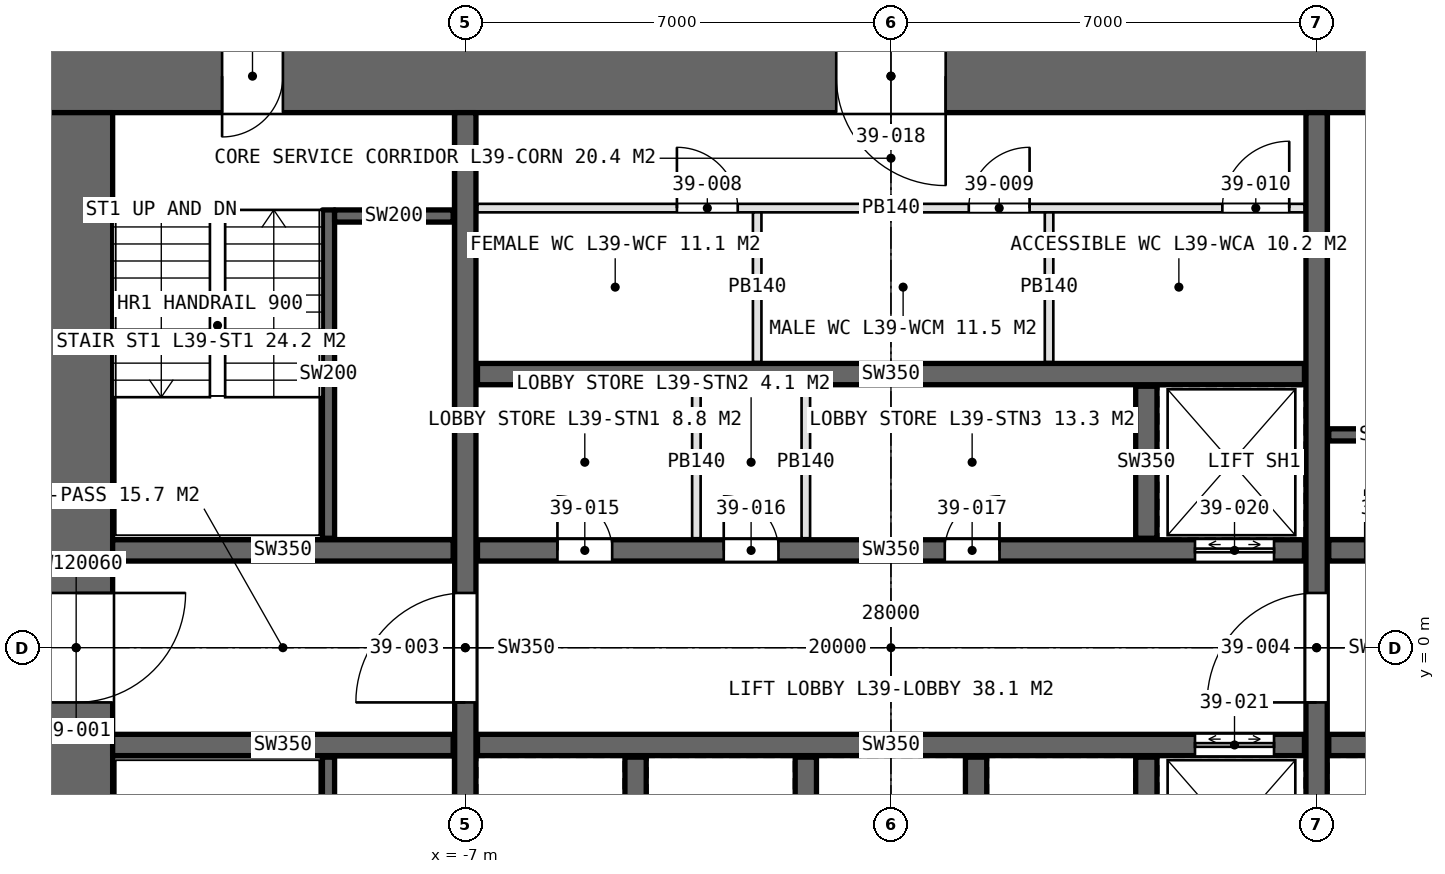
"""IFC4 building model, lengths in metres.
Left out: names, types, materials, properties, quantities, classifications, styles, units other than length and angle.
Written with IfcOpenShell. Run it as: python <this file> out.ifc"""

import sys

from ifc_helpers import new_model, si_unit, direction, frame, frame_2d, origin, place, context, subcontext, project, spatial, rectangle, extrude, element, fill, save


model = new_model("IFC4")
c1 = context("Model", 3, precision=1e-05, world=origin(), true_north=direction((0.0, 1.0)))
c2 = subcontext(c1, "Body", "Model", "MODEL_VIEW")
j1 = project(units=[si_unit("LENGTHUNIT", "METRE"), si_unit("PLANEANGLEUNIT", "RADIAN")], contexts=[c1])
p1 = place(None, origin())
s1 = spatial("IfcSite", under=j1, at=p1, CompositionType="ELEMENT")
p2 = place(p1, origin())
s2 = spatial("IfcBuilding", under=s1, at=p2, CompositionType="ELEMENT")
p3 = place(p2, frame((0.0, 0.0, 180.6)))
s3 = spatial("IfcBuildingStorey", under=s2, at=p3, CompositionType="ELEMENT", Elevation=180.6)
p4 = place(p3, frame((14.0, 9.4, 0.0), z_axis=(0.0, 0.0, 1.0), x_axis=(-1.0, 0.0, 0.0)))
e1 = element("IfcWall", 1, at=p4, inside=s3, PredefinedType="SHEAR", context=c2, shape_type="SweptSolid", body=[
    extrude(rectangle(XDim=28.0, YDim=1.2, at=frame_2d((14.0, 0.0))), origin(), (0.0, 0.0, 1.0), 4.2),
])
p5 = place(p4, frame((24.0, 0.0, 0.0)))
e2 = element("IfcOpeningElement", 2, at=p5, cuts=e1, PredefinedType="OPENING", context=c2, shape_type="SweptSolid", body=[
    extrude(rectangle(XDim=1.0, YDim=2.4, at=frame_2d((0.5, 1.2))), frame((0.0, 0.61, 0.0), z_axis=(0.0, -1.0, 0.0), x_axis=(1.0, 0.0, 0.0)), (0.0, 0.0, 1.0), 1.22),
])
p6 = place(p4, frame((13.1, 0.0, 0.0)))
e3 = element("IfcOpeningElement", 3, at=p6, cuts=e1, PredefinedType="OPENING", context=c2, shape_type="SweptSolid", body=[
    extrude(rectangle(XDim=1.8, YDim=2.4, at=frame_2d((0.9, 1.2))), frame((0.0, 0.61, 0.0), z_axis=(0.0, -1.0, 0.0), x_axis=(1.0, 0.0, 0.0)), (0.0, 0.0, 1.0), 1.22),
])
p7 = place(p3, frame((-13.4, 8.8, 0.0), z_axis=(0.0, 0.0, 1.0), x_axis=(0.0, -1.0, 0.0)))
e4 = element("IfcWall", 4, at=p7, inside=s3, PredefinedType="SHEAR", context=c2, shape_type="SweptSolid", body=[
    extrude(rectangle(XDim=17.6, YDim=1.2, at=frame_2d((8.8, 0.0))), origin(), (0.0, 0.0, 1.0), 4.2),
])
p8 = place(p7, frame((7.9, 0.0, 0.0)))
e5 = element("IfcOpeningElement", 5, at=p8, cuts=e4, PredefinedType="OPENING", context=c2, shape_type="SweptSolid", body=[
    extrude(rectangle(XDim=1.8, YDim=2.4, at=frame_2d((0.9, 1.2))), frame((0.0, 0.61, 0.0), z_axis=(0.0, -1.0, 0.0), x_axis=(1.0, 0.0, 0.0)), (0.0, 0.0, 1.0), 1.22),
])
p9 = place(p7, frame((16.5, 0.0, 0.0)))
e6 = element("IfcOpeningElement", 6, at=p9, cuts=e4, PredefinedType="OPENING", context=c2, shape_type="SweptSolid", body=[
    extrude(rectangle(XDim=1.0, YDim=2.4, at=frame_2d((0.5, 1.2))), frame((0.0, 0.61, 0.0), z_axis=(0.0, -1.0, 0.0), x_axis=(1.0, 0.0, 0.0)), (0.0, 0.0, 1.0), 1.22),
])
p10 = place(p3, frame((-7.0, -8.8, 0.0), z_axis=(0.0, 0.0, 1.0), x_axis=(0.0, 1.0, 0.0)))
e7 = element("IfcWall", 7, at=p10, inside=s3, PredefinedType="SHEAR", context=c2, shape_type="SweptSolid", body=[
    extrude(rectangle(XDim=17.6, YDim=0.35, at=frame_2d((8.8, 0.0))), origin(), (0.0, 0.0, 1.0), 4.2),
])
p11 = place(p10, frame((7.9, 0.0, 0.0)))
e8 = element("IfcOpeningElement", 8, at=p11, cuts=e7, PredefinedType="OPENING", context=c2, shape_type="SweptSolid", body=[
    extrude(rectangle(XDim=1.8, YDim=2.4, at=frame_2d((0.9, 1.2))), frame((0.0, 0.185, 0.0), z_axis=(0.0, -1.0, 0.0), x_axis=(1.0, 0.0, 0.0)), (0.0, 0.0, 1.0), 0.37),
])
p12 = place(p3, frame((7.0, -8.8, 0.0), z_axis=(0.0, 0.0, 1.0), x_axis=(0.0, 1.0, 0.0)))
e9 = element("IfcWall", 9, at=p12, inside=s3, PredefinedType="SHEAR", context=c2, shape_type="SweptSolid", body=[
    extrude(rectangle(XDim=17.6, YDim=0.35, at=frame_2d((8.8, 0.0))), origin(), (0.0, 0.0, 1.0), 4.2),
])
p13 = place(p12, frame((7.9, 0.0, 0.0)))
e10 = element("IfcOpeningElement", 10, at=p13, cuts=e9, PredefinedType="OPENING", context=c2, shape_type="SweptSolid", body=[
    extrude(rectangle(XDim=1.8, YDim=2.4, at=frame_2d((0.9, 1.2))), frame((0.0, 0.185, 0.0), z_axis=(0.0, -1.0, 0.0), x_axis=(1.0, 0.0, 0.0)), (0.0, 0.0, 1.0), 0.37),
])
p14 = place(p3, frame((-6.8, 1.6, 0.0), z_axis=(0.0, 0.0, 1.0), x_axis=(1.0, 0.0, 0.0)))
e11 = element("IfcWall", 11, at=p14, inside=s3, PredefinedType="SHEAR", context=c2, shape_type="SweptSolid", body=[
    extrude(rectangle(XDim=13.6, YDim=0.35, at=frame_2d((6.8, 0.0))), origin(), (0.0, 0.0, 1.0), 4.2),
])
p15 = place(p14, frame((1.315, 0.0, 0.0)))
e12 = element("IfcOpeningElement", 12, at=p15, cuts=e11, PredefinedType="OPENING", context=c2, shape_type="SweptSolid", body=[
    extrude(rectangle(XDim=0.9, YDim=2.4, at=frame_2d((0.45, 1.2))), frame((0.0, 0.185, 0.0), z_axis=(0.0, -1.0, 0.0), x_axis=(1.0, 0.0, 0.0)), (0.0, 0.0, 1.0), 0.37),
])
p16 = place(p14, frame((4.05, 0.0, 0.0)))
e13 = element("IfcOpeningElement", 13, at=p16, cuts=e11, PredefinedType="OPENING", context=c2, shape_type="SweptSolid", body=[
    extrude(rectangle(XDim=0.9, YDim=2.4, at=frame_2d((0.45, 1.2))), frame((0.0, 0.185, 0.0), z_axis=(0.0, -1.0, 0.0), x_axis=(1.0, 0.0, 0.0)), (0.0, 0.0, 1.0), 0.37),
])
p17 = place(p14, frame((7.685, 0.0, 0.0)))
e14 = element("IfcOpeningElement", 14, at=p17, cuts=e11, PredefinedType="OPENING", context=c2, shape_type="SweptSolid", body=[
    extrude(rectangle(XDim=0.9, YDim=2.4, at=frame_2d((0.45, 1.2))), frame((0.0, 0.185, 0.0), z_axis=(0.0, -1.0, 0.0), x_axis=(1.0, 0.0, 0.0)), (0.0, 0.0, 1.0), 0.37),
])
p18 = place(p14, frame((11.8, 0.0, 0.0)))
e15 = element("IfcOpeningElement", 15, at=p18, cuts=e11, PredefinedType="OPENING", context=c2, shape_type="SweptSolid", body=[
    extrude(rectangle(XDim=1.3, YDim=2.4, at=frame_2d((0.65, 1.2))), frame((0.0, 0.185, 0.0), z_axis=(0.0, -1.0, 0.0), x_axis=(1.0, 0.0, 0.0)), (0.0, 0.0, 1.0), 0.37),
])
p19 = place(p3, frame((-6.8, -1.6, 0.0), z_axis=(0.0, 0.0, 1.0), x_axis=(1.0, 0.0, 0.0)))
e16 = element("IfcWall", 16, at=p19, inside=s3, PredefinedType="SHEAR", context=c2, shape_type="SweptSolid", body=[
    extrude(rectangle(XDim=13.6, YDim=0.35, at=frame_2d((6.8, 0.0))), origin(), (0.0, 0.0, 1.0), 4.2),
])
p20 = place(p19, frame((11.8, 0.0, 0.0)))
e17 = element("IfcOpeningElement", 17, at=p20, cuts=e16, PredefinedType="OPENING", context=c2, shape_type="SweptSolid", body=[
    extrude(rectangle(XDim=1.3, YDim=2.4, at=frame_2d((0.65, 1.2))), frame((0.0, 0.185, 0.0), z_axis=(0.0, -1.0, 0.0), x_axis=(1.0, 0.0, 0.0)), (0.0, 0.0, 1.0), 0.37),
])
p21 = place(p3, frame((-6.8, 4.5, 0.0), z_axis=(0.0, 0.0, 1.0), x_axis=(1.0, 0.0, 0.0)))
e18 = element("IfcWall", 18, at=p21, inside=s3, PredefinedType="SHEAR", context=c2, shape_type="SweptSolid", body=[
    extrude(rectangle(XDim=13.6, YDim=0.35, at=frame_2d((6.8, 0.0))), origin(), (0.0, 0.0, 1.0), 4.2),
])
for number, where, z_axis, x_axis in (
    (19, (-12.8, 1.6, 0.0), (0.0, 0.0, 1.0), (1.0, 0.0, 0.0)),
    (20, (-12.8, -1.6, 0.0), (0.0, 0.0, 1.0), (1.0, 0.0, 0.0)),
):
    element("IfcWall", number, at=place(p3, frame(where, z_axis=z_axis, x_axis=x_axis)), inside=s3, PredefinedType="SHEAR", context=c2, shape_type="SweptSolid", body=[
        extrude(rectangle(XDim=5.6, YDim=0.35, at=frame_2d((2.8, 0.0))), origin(), (0.0, 0.0, 1.0), 4.2),
    ])
p22 = place(p3, frame((7.2, 1.6, 0.0), z_axis=(0.0, 0.0, 1.0), x_axis=(1.0, 0.0, 0.0)))
e21 = element("IfcWall", 21, at=p22, inside=s3, PredefinedType="SHEAR", context=c2, shape_type="SweptSolid", body=[
    extrude(rectangle(XDim=5.6, YDim=0.35, at=frame_2d((2.8, 0.0))), origin(), (0.0, 0.0, 1.0), 4.2),
])
p23 = place(p22, frame((0.6, 0.0, 0.0)))
e22 = element("IfcOpeningElement", 22, at=p23, cuts=e21, PredefinedType="OPENING", context=c2, shape_type="SweptSolid", body=[
    extrude(rectangle(XDim=1.0, YDim=2.4, at=frame_2d((0.5, 1.2))), frame((0.0, 0.185, 0.0), z_axis=(0.0, -1.0, 0.0), x_axis=(1.0, 0.0, 0.0)), (0.0, 0.0, 1.0), 0.37),
])
p24 = place(p3, frame((7.2, -1.6, 0.0), z_axis=(0.0, 0.0, 1.0), x_axis=(1.0, 0.0, 0.0)))
e23 = element("IfcWall", 23, at=p24, inside=s3, PredefinedType="SHEAR", context=c2, shape_type="SweptSolid", body=[
    extrude(rectangle(XDim=5.6, YDim=0.35, at=frame_2d((2.8, 0.0))), origin(), (0.0, 0.0, 1.0), 4.2),
])
p25 = place(p24, frame((0.9, 0.0, 0.0)))
e24 = element("IfcOpeningElement", 24, at=p25, cuts=e23, PredefinedType="OPENING", context=c2, shape_type="SweptSolid", body=[
    extrude(rectangle(XDim=1.3, YDim=2.4, at=frame_2d((0.65, 1.2))), frame((0.0, 0.185, 0.0), z_axis=(0.0, -1.0, 0.0), x_axis=(1.0, 0.0, 0.0)), (0.0, 0.0, 1.0), 0.37),
])
p26 = place(p24, frame((3.9, 0.0, 0.0)))
e25 = element("IfcOpeningElement", 25, at=p26, cuts=e23, PredefinedType="OPENING", context=c2, shape_type="SweptSolid", body=[
    extrude(rectangle(XDim=1.3, YDim=2.4, at=frame_2d((0.65, 1.2))), frame((0.0, 0.185, 0.0), z_axis=(0.0, -1.0, 0.0), x_axis=(1.0, 0.0, 0.0)), (0.0, 0.0, 1.0), 0.37),
])
for number, where, z_axis, x_axis in (
    (26, (-4.2, -4.3, 0.0), (0.0, 0.0, 1.0), (0.0, 1.0, 0.0)),
    (27, (-1.4, -4.3, 0.0), (0.0, 0.0, 1.0), (0.0, 1.0, 0.0)),
    (28, (1.4, -4.3, 0.0), (0.0, 0.0, 1.0), (0.0, 1.0, 0.0)),
    (29, (4.2, 1.8, 0.0), (0.0, 0.0, 1.0), (0.0, 1.0, 0.0)),
    (30, (4.2, -4.3, 0.0), (0.0, 0.0, 1.0), (0.0, 1.0, 0.0)),
):
    element("IfcWall", number, at=place(p3, frame(where, z_axis=z_axis, x_axis=x_axis)), inside=s3, PredefinedType="SHEAR", context=c2, shape_type="SweptSolid", body=[
        extrude(rectangle(XDim=2.5, YDim=0.35, at=frame_2d((1.25, 0.0))), origin(), (0.0, 0.0, 1.0), 4.2),
    ])
p27 = place(p3, frame((-6.8, 7.23, 0.0), z_axis=(0.0, 0.0, 1.0), x_axis=(1.0, 0.0, 0.0)))
e31 = element("IfcWall", 31, at=p27, inside=s3, PredefinedType="PARTITIONING", context=c2, shape_type="SweptSolid", body=[
    extrude(rectangle(XDim=13.6, YDim=0.14, at=frame_2d((6.8, 0.0))), origin(), (0.0, 0.0, 1.0), 3.95),
])
p28 = place(p27, frame((3.28, 0.0, 0.0)))
e32 = element("IfcOpeningElement", 32, at=p28, cuts=e31, PredefinedType="OPENING", context=c2, shape_type="SweptSolid", body=[
    extrude(rectangle(XDim=1.0, YDim=2.4, at=frame_2d((0.5, 1.2))), frame((0.0, 0.08, 0.0), z_axis=(0.0, -1.0, 0.0), x_axis=(1.0, 0.0, 0.0)), (0.0, 0.0, 1.0), 0.16),
])
p29 = place(p27, frame((8.08, 0.0, 0.0)))
e33 = element("IfcOpeningElement", 33, at=p29, cuts=e31, PredefinedType="OPENING", context=c2, shape_type="SweptSolid", body=[
    extrude(rectangle(XDim=1.0, YDim=2.4, at=frame_2d((0.5, 1.2))), frame((0.0, 0.08, 0.0), z_axis=(0.0, -1.0, 0.0), x_axis=(1.0, 0.0, 0.0)), (0.0, 0.0, 1.0), 0.16),
])
p30 = place(p27, frame((12.25, 0.0, 0.0)))
e34 = element("IfcOpeningElement", 34, at=p30, cuts=e31, PredefinedType="OPENING", context=c2, shape_type="SweptSolid", body=[
    extrude(rectangle(XDim=1.1, YDim=2.4, at=frame_2d((0.55, 1.2))), frame((0.0, 0.08, 0.0), z_axis=(0.0, -1.0, 0.0), x_axis=(1.0, 0.0, 0.0)), (0.0, 0.0, 1.0), 0.16),
])
for number, where, z_axis, x_axis in (
    (35, (-2.2, 4.7, 0.0), (0.0, 0.0, 1.0), (0.0, 1.0, 0.0)),
    (36, (2.6, 4.7, 0.0), (0.0, 0.0, 1.0), (0.0, 1.0, 0.0)),
):
    element("IfcWall", number, at=place(p3, frame(where, z_axis=z_axis, x_axis=x_axis)), inside=s3, PredefinedType="PARTITIONING", context=c2, shape_type="SweptSolid", body=[
        extrude(rectangle(XDim=2.46, YDim=0.14, at=frame_2d((1.23, 0.0))), origin(), (0.0, 0.0, 1.0), 3.95),
    ])
for number, where, z_axis, x_axis in (
    (37, (-3.2, 1.8, 0.0), (0.0, 0.0, 1.0), (0.0, 1.0, 0.0)),
    (38, (-1.4, 1.8, 0.0), (0.0, 0.0, 1.0), (0.0, 1.0, 0.0)),
):
    element("IfcWall", number, at=place(p3, frame(where, z_axis=z_axis, x_axis=x_axis)), inside=s3, PredefinedType="PARTITIONING", context=c2, shape_type="SweptSolid", body=[
        extrude(rectangle(XDim=2.5, YDim=0.14, at=frame_2d((1.25, 0.0))), origin(), (0.0, 0.0, 1.0), 3.95),
    ])
p31 = place(p3, frame((-9.25, 7.2, 0.0), z_axis=(0.0, 0.0, 1.0), x_axis=(0.0, -1.0, 0.0)))
e39 = element("IfcWall", 39, at=p31, inside=s3, PredefinedType="SOLIDWALL", context=c2, shape_type="SweptSolid", body=[
    extrude(rectangle(XDim=5.4, YDim=0.2, at=frame_2d((2.7, 0.0))), origin(), (0.0, 0.0, 1.0), 4.2),
])
p32 = place(p3, frame((-9.15, 7.1, 0.0), z_axis=(0.0, 0.0, 1.0), x_axis=(1.0, 0.0, 0.0)))
e40 = element("IfcWall", 40, at=p32, inside=s3, PredefinedType="SOLIDWALL", context=c2, shape_type="SweptSolid", body=[
    extrude(rectangle(XDim=1.95, YDim=0.2, at=frame_2d((0.975, 0.0))), origin(), (0.0, 0.0, 1.0), 4.2),
])
p33 = place(p3, frame((-9.25, -7.2, 0.0), z_axis=(0.0, 0.0, 1.0), x_axis=(0.0, 1.0, 0.0)))
e41 = element("IfcWall", 41, at=p33, inside=s3, PredefinedType="SOLIDWALL", context=c2, shape_type="SweptSolid", body=[
    extrude(rectangle(XDim=5.4, YDim=0.2, at=frame_2d((2.7, 0.0))), origin(), (0.0, 0.0, 1.0), 4.2),
])
p34 = place(p3, frame((9.15, 3.5, 0.0), z_axis=(0.0, 0.0, 1.0), x_axis=(-1.0, 0.0, 0.0)))
e42 = element("IfcWall", 42, at=p34, inside=s3, PredefinedType="SOLIDWALL", context=c2, shape_type="SweptSolid", body=[
    extrude(rectangle(XDim=1.95, YDim=0.2, at=frame_2d((0.975, 0.0))), origin(), (0.0, 0.0, 1.0), 4.2),
])
p35 = place(p8, origin())
e43 = element("IfcDoor", 43, at=p35, inside=s3, OperationType="DOUBLE_DOOR_SINGLE_SWING", PredefinedType="DOOR", context=c2, shape_type="SweptSolid", body=[
    extrude(rectangle(XDim=1.8, YDim=2.4, at=frame_2d((0.9, 1.2))), frame((0.0, 0.025, 0.0), z_axis=(0.0, -1.0, 0.0), x_axis=(1.0, 0.0, 0.0)), (0.0, 0.0, 1.0), 0.05),
])
fill(e5, e43)
p36 = place(p11, origin())
e44 = element("IfcDoor", 44, at=p36, inside=s3, OperationType="DOUBLE_DOOR_SINGLE_SWING", PredefinedType="DOOR", context=c2, shape_type="SweptSolid", body=[
    extrude(rectangle(XDim=1.8, YDim=2.4, at=frame_2d((0.9, 1.2))), frame((0.0, 0.025, 0.0), z_axis=(0.0, -1.0, 0.0), x_axis=(1.0, 0.0, 0.0)), (0.0, 0.0, 1.0), 0.05),
])
fill(e8, e44)
p37 = place(p13, origin())
e45 = element("IfcDoor", 45, at=p37, inside=s3, OperationType="DOUBLE_DOOR_SINGLE_SWING", PredefinedType="DOOR", context=c2, shape_type="SweptSolid", body=[
    extrude(rectangle(XDim=1.8, YDim=2.4, at=frame_2d((0.9, 1.2))), frame((0.0, 0.025, 0.0), z_axis=(0.0, -1.0, 0.0), x_axis=(1.0, 0.0, 0.0)), (0.0, 0.0, 1.0), 0.05),
])
fill(e10, e45)
p38 = place(p5, origin())
e46 = element("IfcDoor", 46, at=p38, inside=s3, OperationType="SINGLE_SWING_RIGHT", PredefinedType="DOOR", context=c2, shape_type="SweptSolid", body=[
    extrude(rectangle(XDim=1.0, YDim=2.4, at=frame_2d((0.5, 1.2))), frame((0.0, 0.025, 0.0), z_axis=(0.0, -1.0, 0.0), x_axis=(1.0, 0.0, 0.0)), (0.0, 0.0, 1.0), 0.05),
])
fill(e2, e46)
p39 = place(p28, origin())
e47 = element("IfcDoor", 47, at=p39, inside=s3, OperationType="SINGLE_SWING_LEFT", PredefinedType="DOOR", context=c2, shape_type="SweptSolid", body=[
    extrude(rectangle(XDim=1.0, YDim=2.4, at=frame_2d((0.5, 1.2))), frame((0.0, 0.025, 0.0), z_axis=(0.0, -1.0, 0.0), x_axis=(1.0, 0.0, 0.0)), (0.0, 0.0, 1.0), 0.05),
])
fill(e32, e47)
p40 = place(p29, origin())
e48 = element("IfcDoor", 48, at=p40, inside=s3, OperationType="SINGLE_SWING_RIGHT", PredefinedType="DOOR", context=c2, shape_type="SweptSolid", body=[
    extrude(rectangle(XDim=1.0, YDim=2.4, at=frame_2d((0.5, 1.2))), frame((0.0, 0.025, 0.0), z_axis=(0.0, -1.0, 0.0), x_axis=(1.0, 0.0, 0.0)), (0.0, 0.0, 1.0), 0.05),
])
fill(e33, e48)
p41 = place(p30, origin())
e49 = element("IfcDoor", 49, at=p41, inside=s3, OperationType="SINGLE_SWING_RIGHT", PredefinedType="DOOR", context=c2, shape_type="SweptSolid", body=[
    extrude(rectangle(XDim=1.1, YDim=2.4, at=frame_2d((0.55, 1.2))), frame((0.0, 0.025, 0.0), z_axis=(0.0, -1.0, 0.0), x_axis=(1.0, 0.0, 0.0)), (0.0, 0.0, 1.0), 0.05),
])
fill(e34, e49)
p42 = place(p15, origin())
e50 = element("IfcDoor", 50, at=p42, inside=s3, OperationType="SINGLE_SWING_LEFT", PredefinedType="DOOR", context=c2, shape_type="SweptSolid", body=[
    extrude(rectangle(XDim=0.9, YDim=2.4, at=frame_2d((0.45, 1.2))), frame((0.0, 0.025, 0.0), z_axis=(0.0, -1.0, 0.0), x_axis=(1.0, 0.0, 0.0)), (0.0, 0.0, 1.0), 0.05),
])
fill(e12, e50)
p43 = place(p16, origin())
e51 = element("IfcDoor", 51, at=p43, inside=s3, OperationType="SINGLE_SWING_LEFT", PredefinedType="DOOR", context=c2, shape_type="SweptSolid", body=[
    extrude(rectangle(XDim=0.9, YDim=2.4, at=frame_2d((0.45, 1.2))), frame((0.0, 0.025, 0.0), z_axis=(0.0, -1.0, 0.0), x_axis=(1.0, 0.0, 0.0)), (0.0, 0.0, 1.0), 0.05),
])
fill(e13, e51)
p44 = place(p17, origin())
e52 = element("IfcDoor", 52, at=p44, inside=s3, OperationType="SINGLE_SWING_RIGHT", PredefinedType="DOOR", context=c2, shape_type="SweptSolid", body=[
    extrude(rectangle(XDim=0.9, YDim=2.4, at=frame_2d((0.45, 1.2))), frame((0.0, 0.025, 0.0), z_axis=(0.0, -1.0, 0.0), x_axis=(1.0, 0.0, 0.0)), (0.0, 0.0, 1.0), 0.05),
])
fill(e14, e52)
p45 = place(p6, origin())
e53 = element("IfcDoor", 53, at=p45, inside=s3, OperationType="DOUBLE_DOOR_SINGLE_SWING", PredefinedType="DOOR", context=c2, shape_type="SweptSolid", body=[
    extrude(rectangle(XDim=1.8, YDim=2.4, at=frame_2d((0.9, 1.2))), frame((0.0, 0.025, 0.0), z_axis=(0.0, -1.0, 0.0), x_axis=(1.0, 0.0, 0.0)), (0.0, 0.0, 1.0), 0.05),
])
fill(e3, e53)
p46 = place(p18, origin())
e54 = element("IfcDoor", 54, at=p46, inside=s3, OperationType="DOUBLE_DOOR_SLIDING", PredefinedType="DOOR", context=c2, shape_type="SweptSolid", body=[
    extrude(rectangle(XDim=1.3, YDim=2.4, at=frame_2d((0.65, 1.2))), frame((0.0, 0.025, 0.0), z_axis=(0.0, -1.0, 0.0), x_axis=(1.0, 0.0, 0.0)), (0.0, 0.0, 1.0), 0.05),
])
fill(e15, e54)
p47 = place(p20, origin())
e55 = element("IfcDoor", 55, at=p47, inside=s3, OperationType="DOUBLE_DOOR_SLIDING", PredefinedType="DOOR", context=c2, shape_type="SweptSolid", body=[
    extrude(rectangle(XDim=1.3, YDim=2.4, at=frame_2d((0.65, 1.2))), frame((0.0, 0.025, 0.0), z_axis=(0.0, -1.0, 0.0), x_axis=(1.0, 0.0, 0.0)), (0.0, 0.0, 1.0), 0.05),
])
fill(e17, e55)
save(model, sys.argv[1])
